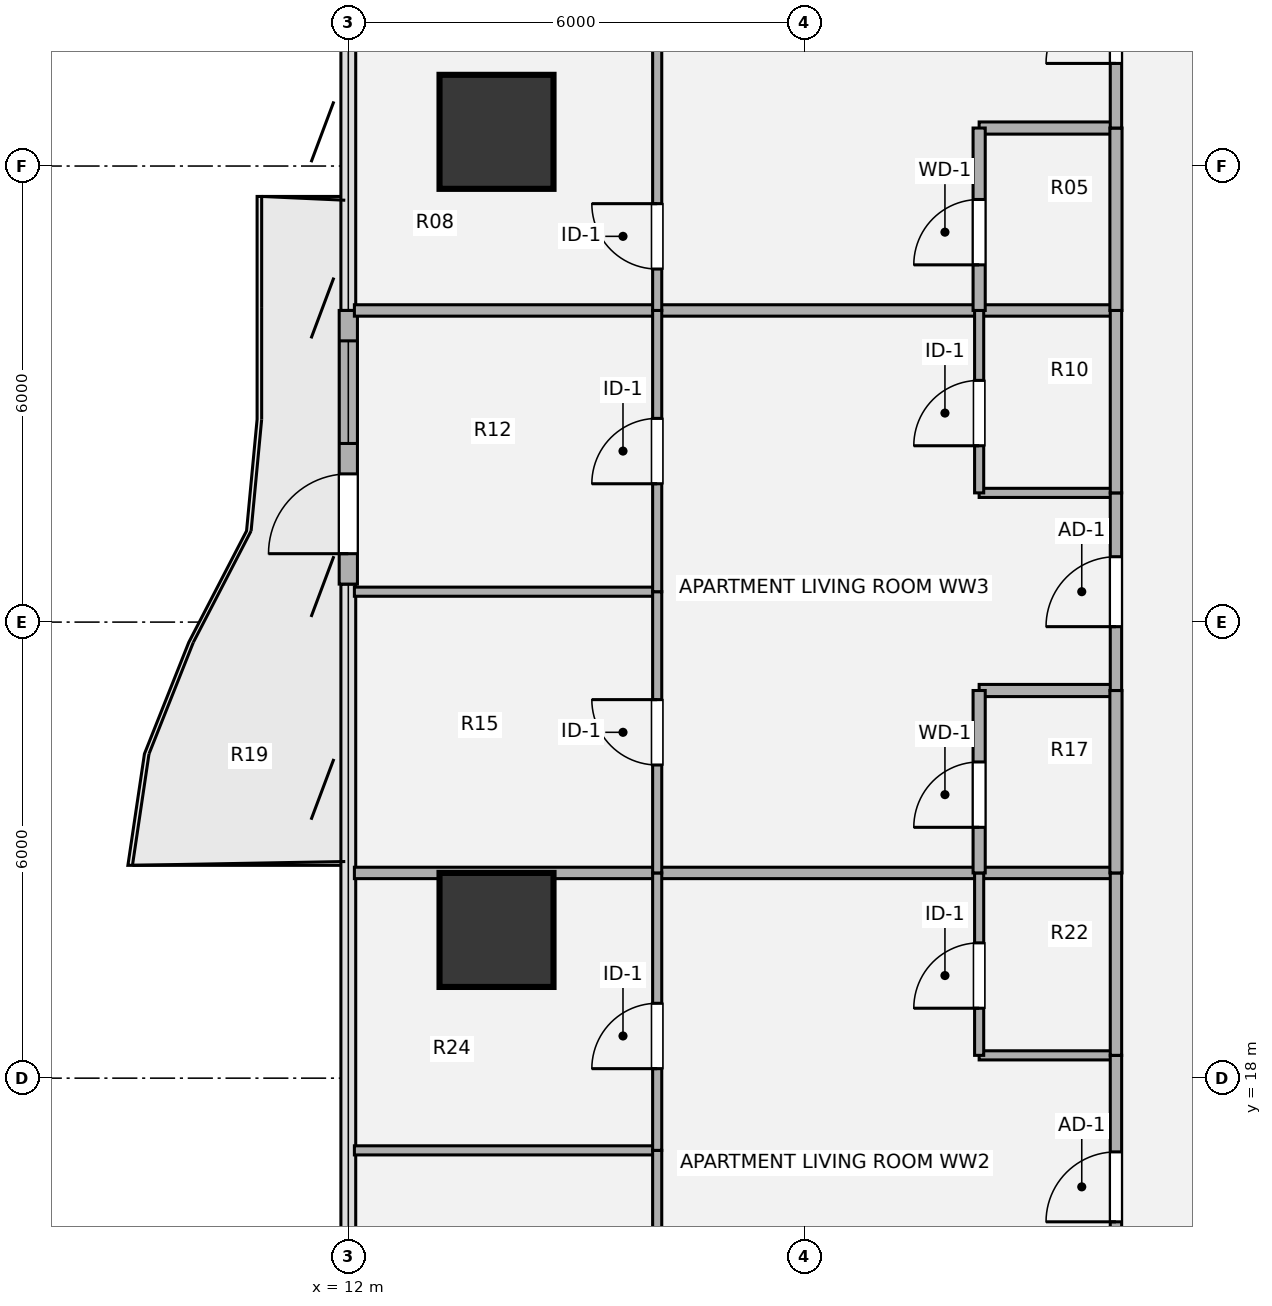
"""IFC4 building model, lengths in metres.
Left out: names, types, materials, properties, quantities, classifications, styles, units other than length and angle.
Written with IfcOpenShell. Run it as: python <this file> out.ifc"""

import sys

from ifc_helpers import new_model, si_unit, direction, frame, frame_2d, origin, origin_2d, place, context, subcontext, project, spatial, rectangle, hollow_circle, extrude, source, transform, mapped, element, fill, save


model = new_model("IFC4")
c1 = context("Model", 3, precision=1e-05, world=origin(), true_north=direction((0.0, 1.0)))
c2 = subcontext(c1, "Body", "Model", "MODEL_VIEW")
j1 = project(units=[si_unit("LENGTHUNIT", "METRE"), si_unit("PLANEANGLEUNIT", "RADIAN")], contexts=[c1])
p1 = place(None, origin())
s1 = spatial("IfcSite", under=j1, at=p1, CompositionType="ELEMENT")
p2 = place(p1, origin())
s2 = spatial("IfcBuilding", under=s1, at=p2, CompositionType="ELEMENT")
p3 = place(p2, frame((0.0, 0.0, 30.78)))
s3 = spatial("IfcBuildingStorey", under=s2, at=p3, CompositionType="ELEMENT", Elevation=30.78)
m1 = source(origin(), c2, "Body", "SweptSolid", [
    extrude(hollow_circle(Radius=0.75, WallThickness=0.05, at=origin_2d()), origin(), (0.0, 0.0, 1.0), 3.78),
])
for number, where, z_axis, x_axis in (
    (1, (13.95, 19.95, 0.0), (0.0, 0.0, 1.0), (1.0, 0.0, 0.0)),
    (2, (13.95, 30.45, 0.0), (0.0, 0.0, 1.0), (1.0, 0.0, 0.0)),
):
    element("IfcColumn", number, at=place(p3, frame(where, z_axis=z_axis, x_axis=x_axis)), inside=s3, PredefinedType="COLUMN", context=c2, shape_type="MappedRepresentation", body=[
        mapped(m1, transform((0.0, 0.0, 0.0), x_axis=(1.0, 0.0, 0.0), y_axis=(0.0, 1.0, 0.0), z_axis=(0.0, 0.0, 1.0), scale=1.0)),
    ])
p4 = place(p3, frame((12.0, 24.5, 0.0), z_axis=(0.0, 0.0, 1.0), x_axis=(0.0, 1.0, 0.0)))
e3 = element("IfcWall", 3, at=p4, inside=s3, PredefinedType="SOLIDWALL", context=c2, shape_type="SweptSolid", body=[
    extrude(rectangle(XDim=3.6, YDim=0.24, at=frame_2d((1.8, 0.0))), origin(), (0.0, 0.0, 1.0), 3.53),
])
p5 = place(p4, frame((0.4, 0.0, 0.0)))
e4 = element("IfcOpeningElement", 4, at=p5, cuts=e3, PredefinedType="OPENING", context=c2, shape_type="SweptSolid", body=[
    extrude(rectangle(XDim=1.05, YDim=2.15, at=origin_2d()), frame((0.525, 0.13, 1.075), z_axis=(0.0, -1.0, 0.0), x_axis=(1.0, 0.0, 0.0)), (0.0, 0.0, 1.0), 0.26),
])
p6 = place(p4, frame((1.85, 0.0, 0.85)))
e5 = element("IfcOpeningElement", 5, at=p6, cuts=e3, PredefinedType="OPENING", context=c2, shape_type="SweptSolid", body=[
    extrude(rectangle(XDim=1.35, YDim=1.35, at=origin_2d()), frame((0.675, 0.13, 0.675), z_axis=(0.0, -1.0, 0.0), x_axis=(1.0, 0.0, 0.0)), (0.0, 0.0, 1.0), 0.26),
])
p7 = place(p3, frame((12.08, 17.05, 0.0), z_axis=(0.0, 0.0, 1.0), x_axis=(1.0, 0.0, 0.0)))
e6 = element("IfcWall", 6, at=p7, inside=s3, PredefinedType="PARTITIONING", context=c2, shape_type="SweptSolid", body=[
    extrude(rectangle(XDim=3.984, YDim=0.12, at=frame_2d((1.992, 0.0))), origin(), (0.0, 0.0, 1.0), 3.5),
])
p8 = place(p3, frame((20.3, 18.3, 0.0), z_axis=(0.0, 0.0, 1.0), x_axis=(1.0, 0.0, 0.0)))
e7 = element("IfcWall", 7, at=p8, inside=s3, PredefinedType="PARTITIONING", context=c2, shape_type="SweptSolid", body=[
    extrude(rectangle(XDim=1.8, YDim=0.12, at=frame_2d((0.9, 0.0))), origin(), (0.0, 0.0, 1.0), 2.715),
])
p9 = place(p3, frame((12.08, 20.7, 0.0), z_axis=(0.0, 0.0, 1.0), x_axis=(1.0, 0.0, 0.0)))
e8 = element("IfcWall", 8, at=p9, inside=s3, PredefinedType="PARTITIONING", context=c2, shape_type="SweptSolid", body=[
    extrude(rectangle(XDim=10.02, YDim=0.15, at=frame_2d((5.01, 0.0))), origin(), (0.0, 0.0, 1.0), 2.982),
])
p10 = place(p3, frame((20.3, 23.1, 0.0), z_axis=(0.0, 0.0, 1.0), x_axis=(1.0, 0.0, 0.0)))
e9 = element("IfcWall", 9, at=p10, inside=s3, PredefinedType="PLUMBINGWALL", context=c2, shape_type="SweptSolid", body=[
    extrude(rectangle(XDim=1.8, YDim=0.16, at=frame_2d((0.9, 0.0))), origin(), (0.0, 0.0, 1.0), 3.055),
])
p11 = place(p3, frame((12.08, 24.4, 0.0), z_axis=(0.0, 0.0, 1.0), x_axis=(1.0, 0.0, 0.0)))
e10 = element("IfcWall", 10, at=p11, inside=s3, PredefinedType="PARTITIONING", context=c2, shape_type="SweptSolid", body=[
    extrude(rectangle(XDim=3.984, YDim=0.12, at=frame_2d((1.992, 0.0))), origin(), (0.0, 0.0, 1.0), 2.982),
])
p12 = place(p3, frame((20.3, 25.7, 0.0), z_axis=(0.0, 0.0, 1.0), x_axis=(1.0, 0.0, 0.0)))
e11 = element("IfcWall", 11, at=p12, inside=s3, PredefinedType="PARTITIONING", context=c2, shape_type="SweptSolid", body=[
    extrude(rectangle(XDim=1.8, YDim=0.12, at=frame_2d((0.9, 0.0))), origin(), (0.0, 0.0, 1.0), 2.982),
])
p13 = place(p3, frame((12.08, 28.1, 0.0), z_axis=(0.0, 0.0, 1.0), x_axis=(1.0, 0.0, 0.0)))
e12 = element("IfcWall", 12, at=p13, inside=s3, PredefinedType="PARTITIONING", context=c2, shape_type="SweptSolid", body=[
    extrude(rectangle(XDim=10.02, YDim=0.15, at=frame_2d((5.01, 0.0))), origin(), (0.0, 0.0, 1.0), 2.982),
])
p14 = place(p3, frame((20.3, 30.5, 0.0), z_axis=(0.0, 0.0, 1.0), x_axis=(1.0, 0.0, 0.0)))
e13 = element("IfcWall", 13, at=p14, inside=s3, PredefinedType="PLUMBINGWALL", context=c2, shape_type="SweptSolid", body=[
    extrude(rectangle(XDim=1.8, YDim=0.16, at=frame_2d((0.9, 0.0))), origin(), (0.0, 0.0, 1.0), 2.903),
])
p15 = place(p3, frame((16.064, 13.4, 0.0), z_axis=(0.0, 0.0, 1.0), x_axis=(0.0, 1.0, 0.0)))
e14 = element("IfcWall", 14, at=p15, inside=s3, PredefinedType="PARTITIONING", context=c2, shape_type="SweptSolid", body=[
    extrude(rectangle(XDim=3.65, YDim=0.12, at=frame_2d((1.825, 0.0))), origin(), (0.0, 0.0, 1.0), 3.5),
])
p16 = place(p15, frame((1.395, 0.0, 0.0)))
e15 = element("IfcOpeningElement", 15, at=p16, cuts=e14, PredefinedType="OPENING", context=c2, shape_type="SweptSolid", body=[
    extrude(rectangle(XDim=0.86, YDim=2.1, at=origin_2d()), frame((0.43, 0.07, 1.05), z_axis=(0.0, -1.0, 0.0), x_axis=(1.0, 0.0, 0.0)), (0.0, 0.0, 1.0), 0.14),
])
p17 = place(p3, frame((16.064, 17.05, 0.0), z_axis=(0.0, 0.0, 1.0), x_axis=(0.0, 1.0, 0.0)))
e16 = element("IfcWall", 16, at=p17, inside=s3, PredefinedType="PARTITIONING", context=c2, shape_type="SweptSolid", body=[
    extrude(rectangle(XDim=3.65, YDim=0.12, at=frame_2d((1.825, 0.0))), origin(), (0.0, 0.0, 1.0), 3.5),
])
p18 = place(p17, frame((1.075, 0.0, 0.0)))
e17 = element("IfcOpeningElement", 17, at=p18, cuts=e16, PredefinedType="OPENING", context=c2, shape_type="SweptSolid", body=[
    extrude(rectangle(XDim=0.86, YDim=2.1, at=origin_2d()), frame((0.43, 0.07, 1.05), z_axis=(0.0, -1.0, 0.0), x_axis=(1.0, 0.0, 0.0)), (0.0, 0.0, 1.0), 0.14),
])
p19 = place(p3, frame((16.064, 20.7, 0.0), z_axis=(0.0, 0.0, 1.0), x_axis=(0.0, 1.0, 0.0)))
e18 = element("IfcWall", 18, at=p19, inside=s3, PredefinedType="PARTITIONING", context=c2, shape_type="SweptSolid", body=[
    extrude(rectangle(XDim=3.7, YDim=0.12, at=frame_2d((1.85, 0.0))), origin(), (0.0, 0.0, 1.0), 3.5),
])
p20 = place(p19, frame((1.42, 0.0, 0.0)))
e19 = element("IfcOpeningElement", 19, at=p20, cuts=e18, PredefinedType="OPENING", context=c2, shape_type="SweptSolid", body=[
    extrude(rectangle(XDim=0.86, YDim=2.1, at=origin_2d()), frame((0.43, 0.07, 1.05), z_axis=(0.0, -1.0, 0.0), x_axis=(1.0, 0.0, 0.0)), (0.0, 0.0, 1.0), 0.14),
])
p21 = place(p3, frame((16.064, 24.4, 0.0), z_axis=(0.0, 0.0, 1.0), x_axis=(0.0, 1.0, 0.0)))
e20 = element("IfcWall", 20, at=p21, inside=s3, PredefinedType="PARTITIONING", context=c2, shape_type="SweptSolid", body=[
    extrude(rectangle(XDim=3.7, YDim=0.12, at=frame_2d((1.85, 0.0))), origin(), (0.0, 0.0, 1.0), 3.5),
])
p22 = place(p21, frame((1.42, 0.0, 0.0)))
e21 = element("IfcOpeningElement", 21, at=p22, cuts=e20, PredefinedType="OPENING", context=c2, shape_type="SweptSolid", body=[
    extrude(rectangle(XDim=0.86, YDim=2.1, at=origin_2d()), frame((0.43, 0.07, 1.05), z_axis=(0.0, -1.0, 0.0), x_axis=(1.0, 0.0, 0.0)), (0.0, 0.0, 1.0), 0.14),
])
p23 = place(p3, frame((16.064, 28.1, 0.0), z_axis=(0.0, 0.0, 1.0), x_axis=(0.0, 1.0, 0.0)))
e22 = element("IfcWall", 22, at=p23, inside=s3, PredefinedType="PARTITIONING", context=c2, shape_type="SweptSolid", body=[
    extrude(rectangle(XDim=3.71, YDim=0.12, at=frame_2d((1.855, 0.0))), origin(), (0.0, 0.0, 1.0), 3.5),
])
p24 = place(p23, frame((0.545, 0.0, 0.0)))
e23 = element("IfcOpeningElement", 23, at=p24, cuts=e22, PredefinedType="OPENING", context=c2, shape_type="SweptSolid", body=[
    extrude(rectangle(XDim=0.86, YDim=2.1, at=origin_2d()), frame((0.43, 0.07, 1.05), z_axis=(0.0, -1.0, 0.0), x_axis=(1.0, 0.0, 0.0)), (0.0, 0.0, 1.0), 0.14),
])
p25 = place(p3, frame((20.3, 18.3, 0.0), z_axis=(0.0, 0.0, 1.0), x_axis=(0.0, 1.0, 0.0)))
e24 = element("IfcWall", 24, at=p25, inside=s3, PredefinedType="PARTITIONING", context=c2, shape_type="SweptSolid", body=[
    extrude(rectangle(XDim=2.4, YDim=0.12, at=frame_2d((1.2, 0.0))), origin(), (0.0, 0.0, 1.0), 3.5),
])
p26 = place(p25, frame((0.62, 0.0, 0.0)))
e25 = element("IfcOpeningElement", 25, at=p26, cuts=e24, PredefinedType="OPENING", context=c2, shape_type="SweptSolid", body=[
    extrude(rectangle(XDim=0.86, YDim=2.1, at=origin_2d()), frame((0.43, 0.07, 1.05), z_axis=(0.0, -1.0, 0.0), x_axis=(1.0, 0.0, 0.0)), (0.0, 0.0, 1.0), 0.14),
])
p27 = place(p3, frame((20.3, 20.7, 0.0), z_axis=(0.0, 0.0, 1.0), x_axis=(0.0, 1.0, 0.0)))
e26 = element("IfcWall", 26, at=p27, inside=s3, PredefinedType="PLUMBINGWALL", context=c2, shape_type="SweptSolid", body=[
    extrude(rectangle(XDim=2.4, YDim=0.16, at=frame_2d((1.2, 0.0))), origin(), (0.0, 0.0, 1.0), 3.5),
])
p28 = place(p27, frame((0.6, 0.0, 0.0)))
e27 = element("IfcOpeningElement", 27, at=p28, cuts=e26, PredefinedType="OPENING", context=c2, shape_type="SweptSolid", body=[
    extrude(rectangle(XDim=0.86, YDim=2.1, at=origin_2d()), frame((0.43, 0.09, 1.05), z_axis=(0.0, -1.0, 0.0), x_axis=(1.0, 0.0, 0.0)), (0.0, 0.0, 1.0), 0.18),
])
p29 = place(p3, frame((20.3, 25.7, 0.0), z_axis=(0.0, 0.0, 1.0), x_axis=(0.0, 1.0, 0.0)))
e28 = element("IfcWall", 28, at=p29, inside=s3, PredefinedType="PARTITIONING", context=c2, shape_type="SweptSolid", body=[
    extrude(rectangle(XDim=2.4, YDim=0.12, at=frame_2d((1.2, 0.0))), origin(), (0.0, 0.0, 1.0), 3.5),
])
p30 = place(p29, frame((0.62, 0.0, 0.0)))
e29 = element("IfcOpeningElement", 29, at=p30, cuts=e28, PredefinedType="OPENING", context=c2, shape_type="SweptSolid", body=[
    extrude(rectangle(XDim=0.86, YDim=2.1, at=origin_2d()), frame((0.43, 0.07, 1.05), z_axis=(0.0, -1.0, 0.0), x_axis=(1.0, 0.0, 0.0)), (0.0, 0.0, 1.0), 0.14),
])
p31 = place(p3, frame((20.3, 28.1, 0.0), z_axis=(0.0, 0.0, 1.0), x_axis=(0.0, 1.0, 0.0)))
e30 = element("IfcWall", 30, at=p31, inside=s3, PredefinedType="PLUMBINGWALL", context=c2, shape_type="SweptSolid", body=[
    extrude(rectangle(XDim=2.4, YDim=0.16, at=frame_2d((1.2, 0.0))), origin(), (0.0, 0.0, 1.0), 3.5),
])
p32 = place(p31, frame((0.6, 0.0, 0.0)))
e31 = element("IfcOpeningElement", 31, at=p32, cuts=e30, PredefinedType="OPENING", context=c2, shape_type="SweptSolid", body=[
    extrude(rectangle(XDim=0.86, YDim=2.1, at=origin_2d()), frame((0.43, 0.09, 1.05), z_axis=(0.0, -1.0, 0.0), x_axis=(1.0, 0.0, 0.0)), (0.0, 0.0, 1.0), 0.18),
])
p33 = place(p3, frame((22.1, 15.8, 0.0), z_axis=(0.0, 0.0, 1.0), x_axis=(0.0, 1.0, 0.0)))
e32 = element("IfcWall", 32, at=p33, inside=s3, PredefinedType="PARTITIONING", context=c2, shape_type="SweptSolid", body=[
    extrude(rectangle(XDim=2.5, YDim=0.15, at=frame_2d((1.25, 0.0))), origin(), (0.0, 0.0, 1.0), 3.5),
])
p34 = place(p33, frame((0.31, 0.0, 0.0)))
e33 = element("IfcOpeningElement", 33, at=p34, cuts=e32, PredefinedType="OPENING", context=c2, shape_type="SweptSolid", body=[
    extrude(rectangle(XDim=0.92, YDim=2.1, at=origin_2d()), frame((0.46, 0.085, 1.05), z_axis=(0.0, -1.0, 0.0), x_axis=(1.0, 0.0, 0.0)), (0.0, 0.0, 1.0), 0.17),
])
p35 = place(p3, frame((22.1, 18.3, 0.0), z_axis=(0.0, 0.0, 1.0), x_axis=(0.0, 1.0, 0.0)))
e34 = element("IfcWall", 34, at=p35, inside=s3, PredefinedType="PARTITIONING", context=c2, shape_type="SweptSolid", body=[
    extrude(rectangle(XDim=2.4, YDim=0.15, at=frame_2d((1.2, 0.0))), origin(), (0.0, 0.0, 1.0), 3.5),
])
p36 = place(p3, frame((22.1, 20.7, 0.0), z_axis=(0.0, 0.0, 1.0), x_axis=(0.0, 1.0, 0.0)))
e35 = element("IfcWall", 35, at=p36, inside=s3, PredefinedType="PLUMBINGWALL", context=c2, shape_type="SweptSolid", body=[
    extrude(rectangle(XDim=2.4, YDim=0.16, at=frame_2d((1.2, 0.0))), origin(), (0.0, 0.0, 1.0), 3.5),
])
p37 = place(p3, frame((22.1, 23.1, 0.0), z_axis=(0.0, 0.0, 1.0), x_axis=(0.0, 1.0, 0.0)))
e36 = element("IfcWall", 36, at=p37, inside=s3, PredefinedType="PARTITIONING", context=c2, shape_type="SweptSolid", body=[
    extrude(rectangle(XDim=2.6, YDim=0.15, at=frame_2d((1.3, 0.0))), origin(), (0.0, 0.0, 1.0), 3.5),
])
p38 = place(p37, frame((0.84, 0.0, 0.0)))
e37 = element("IfcOpeningElement", 37, at=p38, cuts=e36, PredefinedType="OPENING", context=c2, shape_type="SweptSolid", body=[
    extrude(rectangle(XDim=0.92, YDim=2.1, at=origin_2d()), frame((0.46, 0.085, 1.05), z_axis=(0.0, -1.0, 0.0), x_axis=(1.0, 0.0, 0.0)), (0.0, 0.0, 1.0), 0.17),
])
p39 = place(p3, frame((22.1, 25.7, 0.0), z_axis=(0.0, 0.0, 1.0), x_axis=(0.0, 1.0, 0.0)))
e38 = element("IfcWall", 38, at=p39, inside=s3, PredefinedType="PARTITIONING", context=c2, shape_type="SweptSolid", body=[
    extrude(rectangle(XDim=2.4, YDim=0.15, at=frame_2d((1.2, 0.0))), origin(), (0.0, 0.0, 1.0), 3.5),
])
p40 = place(p3, frame((22.1, 28.1, 0.0), z_axis=(0.0, 0.0, 1.0), x_axis=(0.0, 1.0, 0.0)))
e39 = element("IfcWall", 39, at=p40, inside=s3, PredefinedType="PLUMBINGWALL", context=c2, shape_type="SweptSolid", body=[
    extrude(rectangle(XDim=2.4, YDim=0.16, at=frame_2d((1.2, 0.0))), origin(), (0.0, 0.0, 1.0), 3.5),
])
p41 = place(p3, frame((22.1, 30.5, 0.0), z_axis=(0.0, 0.0, 1.0), x_axis=(0.0, 1.0, 0.0)))
e40 = element("IfcWall", 40, at=p41, inside=s3, PredefinedType="PARTITIONING", context=c2, shape_type="SweptSolid", body=[
    extrude(rectangle(XDim=2.62, YDim=0.15, at=frame_2d((1.31, 0.0))), origin(), (0.0, 0.0, 1.0), 3.5),
])
p42 = place(p41, frame((0.85, 0.0, 0.0)))
e41 = element("IfcOpeningElement", 41, at=p42, cuts=e40, PredefinedType="OPENING", context=c2, shape_type="SweptSolid", body=[
    extrude(rectangle(XDim=0.92, YDim=2.1, at=origin_2d()), frame((0.46, 0.085, 1.05), z_axis=(0.0, -1.0, 0.0), x_axis=(1.0, 0.0, 0.0)), (0.0, 0.0, 1.0), 0.17),
])
m2 = source(origin(), c2, "Body", "SweptSolid", [
    extrude(rectangle(XDim=1.05, YDim=2.15, at=origin_2d()), frame((0.525, 0.025, 1.075), z_axis=(0.0, -1.0, 0.0), x_axis=(1.0, 0.0, 0.0)), (0.0, 0.0, 1.0), 0.05),
])
p43 = place(p5, origin())
e42 = element("IfcDoor", 42, at=p43, inside=s3, OperationType="SINGLE_SWING_LEFT", PredefinedType="DOOR", context=c2, shape_type="MappedRepresentation", body=[
    mapped(m2, transform((0.0, 0.0, 0.0), x_axis=(1.0, 0.0, 0.0), y_axis=(0.0, 1.0, 0.0), z_axis=(0.0, 0.0, 1.0), scale=1.0)),
])
fill(e4, e42)
m3 = source(origin(), c2, "Body", "SweptSolid", [
    extrude(rectangle(XDim=1.35, YDim=1.35, at=origin_2d()), frame((0.675, 0.03, 0.675), z_axis=(0.0, -1.0, 0.0), x_axis=(1.0, 0.0, 0.0)), (0.0, 0.0, 1.0), 0.06),
])
p44 = place(p6, origin())
e43 = element("IfcWindow", 43, at=p44, inside=s3, PartitioningType="SINGLE_PANEL", PredefinedType="WINDOW", context=c2, shape_type="MappedRepresentation", body=[
    mapped(m3, transform((0.0, 0.0, 0.0), x_axis=(1.0, 0.0, 0.0), y_axis=(0.0, 1.0, 0.0), z_axis=(0.0, 0.0, 1.0), scale=1.0)),
])
fill(e5, e43)
m4 = source(origin(), c2, "Body", "SweptSolid", [
    extrude(rectangle(XDim=0.86, YDim=2.1, at=origin_2d()), frame((0.43, 0.025, 1.05), z_axis=(0.0, -1.0, 0.0), x_axis=(1.0, 0.0, 0.0)), (0.0, 0.0, 1.0), 0.05),
])
p45 = place(p18, origin())
e44 = element("IfcDoor", 44, at=p45, inside=s3, OperationType="SINGLE_SWING_LEFT", PredefinedType="DOOR", context=c2, shape_type="MappedRepresentation", body=[
    mapped(m4, transform((0.0, 0.0, 0.0), x_axis=(1.0, 0.0, 0.0), y_axis=(0.0, 1.0, 0.0), z_axis=(0.0, 0.0, 1.0), scale=1.0)),
])
fill(e17, e44)
p46 = place(p20, origin())
e45 = element("IfcDoor", 45, at=p46, inside=s3, OperationType="SINGLE_SWING_RIGHT", PredefinedType="DOOR", context=c2, shape_type="MappedRepresentation", body=[
    mapped(m4, transform((0.0, 0.0, 0.0), x_axis=(1.0, 0.0, 0.0), y_axis=(0.0, 1.0, 0.0), z_axis=(0.0, 0.0, 1.0), scale=1.0)),
])
fill(e19, e45)
p47 = place(p22, origin())
e46 = element("IfcDoor", 46, at=p47, inside=s3, OperationType="SINGLE_SWING_LEFT", PredefinedType="DOOR", context=c2, shape_type="MappedRepresentation", body=[
    mapped(m4, transform((0.0, 0.0, 0.0), x_axis=(1.0, 0.0, 0.0), y_axis=(0.0, 1.0, 0.0), z_axis=(0.0, 0.0, 1.0), scale=1.0)),
])
fill(e21, e46)
p48 = place(p24, origin())
e47 = element("IfcDoor", 47, at=p48, inside=s3, OperationType="SINGLE_SWING_RIGHT", PredefinedType="DOOR", context=c2, shape_type="MappedRepresentation", body=[
    mapped(m4, transform((0.0, 0.0, 0.0), x_axis=(1.0, 0.0, 0.0), y_axis=(0.0, 1.0, 0.0), z_axis=(0.0, 0.0, 1.0), scale=1.0)),
])
fill(e23, e47)
p49 = place(p26, origin())
e48 = element("IfcDoor", 48, at=p49, inside=s3, OperationType="SINGLE_SWING_LEFT", PredefinedType="DOOR", context=c2, shape_type="MappedRepresentation", body=[
    mapped(m4, transform((0.0, 0.0, 0.0), x_axis=(1.0, 0.0, 0.0), y_axis=(0.0, 1.0, 0.0), z_axis=(0.0, 0.0, 1.0), scale=1.0)),
])
fill(e25, e48)
m5 = source(origin(), c2, "Body", "SweptSolid", [
    extrude(rectangle(XDim=0.86, YDim=2.1, at=origin_2d()), frame((0.43, 0.025, 1.05), z_axis=(0.0, -1.0, 0.0), x_axis=(1.0, 0.0, 0.0)), (0.0, 0.0, 1.0), 0.05),
])
p50 = place(p28, origin())
e49 = element("IfcDoor", 49, at=p50, inside=s3, OperationType="SINGLE_SWING_LEFT", PredefinedType="DOOR", context=c2, shape_type="MappedRepresentation", body=[
    mapped(m5, transform((0.0, 0.0, 0.0), x_axis=(1.0, 0.0, 0.0), y_axis=(0.0, 1.0, 0.0), z_axis=(0.0, 0.0, 1.0), scale=1.0)),
])
fill(e27, e49)
p51 = place(p30, origin())
e50 = element("IfcDoor", 50, at=p51, inside=s3, OperationType="SINGLE_SWING_LEFT", PredefinedType="DOOR", context=c2, shape_type="MappedRepresentation", body=[
    mapped(m4, transform((0.0, 0.0, 0.0), x_axis=(1.0, 0.0, 0.0), y_axis=(0.0, 1.0, 0.0), z_axis=(0.0, 0.0, 1.0), scale=1.0)),
])
fill(e29, e50)
p52 = place(p32, origin())
e51 = element("IfcDoor", 51, at=p52, inside=s3, OperationType="SINGLE_SWING_LEFT", PredefinedType="DOOR", context=c2, shape_type="MappedRepresentation", body=[
    mapped(m5, transform((0.0, 0.0, 0.0), x_axis=(1.0, 0.0, 0.0), y_axis=(0.0, 1.0, 0.0), z_axis=(0.0, 0.0, 1.0), scale=1.0)),
])
fill(e31, e51)
m6 = source(origin(), c2, "Body", "SweptSolid", [
    extrude(rectangle(XDim=0.92, YDim=2.1, at=origin_2d()), frame((0.46, 0.025, 1.05), z_axis=(0.0, -1.0, 0.0), x_axis=(1.0, 0.0, 0.0)), (0.0, 0.0, 1.0), 0.05),
])
p53 = place(p34, origin())
e52 = element("IfcDoor", 52, at=p53, inside=s3, OperationType="SINGLE_SWING_LEFT", PredefinedType="DOOR", context=c2, shape_type="MappedRepresentation", body=[
    mapped(m6, transform((0.0, 0.0, 0.0), x_axis=(1.0, 0.0, 0.0), y_axis=(0.0, 1.0, 0.0), z_axis=(0.0, 0.0, 1.0), scale=1.0)),
])
fill(e33, e52)
p54 = place(p38, origin())
e53 = element("IfcDoor", 53, at=p54, inside=s3, OperationType="SINGLE_SWING_LEFT", PredefinedType="DOOR", context=c2, shape_type="MappedRepresentation", body=[
    mapped(m6, transform((0.0, 0.0, 0.0), x_axis=(1.0, 0.0, 0.0), y_axis=(0.0, 1.0, 0.0), z_axis=(0.0, 0.0, 1.0), scale=1.0)),
])
fill(e37, e53)
p55 = place(p42, origin())
e54 = element("IfcDoor", 54, at=p55, inside=s3, OperationType="SINGLE_SWING_LEFT", PredefinedType="DOOR", context=c2, shape_type="MappedRepresentation", body=[
    mapped(m6, transform((0.0, 0.0, 0.0), x_axis=(1.0, 0.0, 0.0), y_axis=(0.0, 1.0, 0.0), z_axis=(0.0, 0.0, 1.0), scale=1.0)),
])
fill(e41, e54)
save(model, sys.argv[1])
